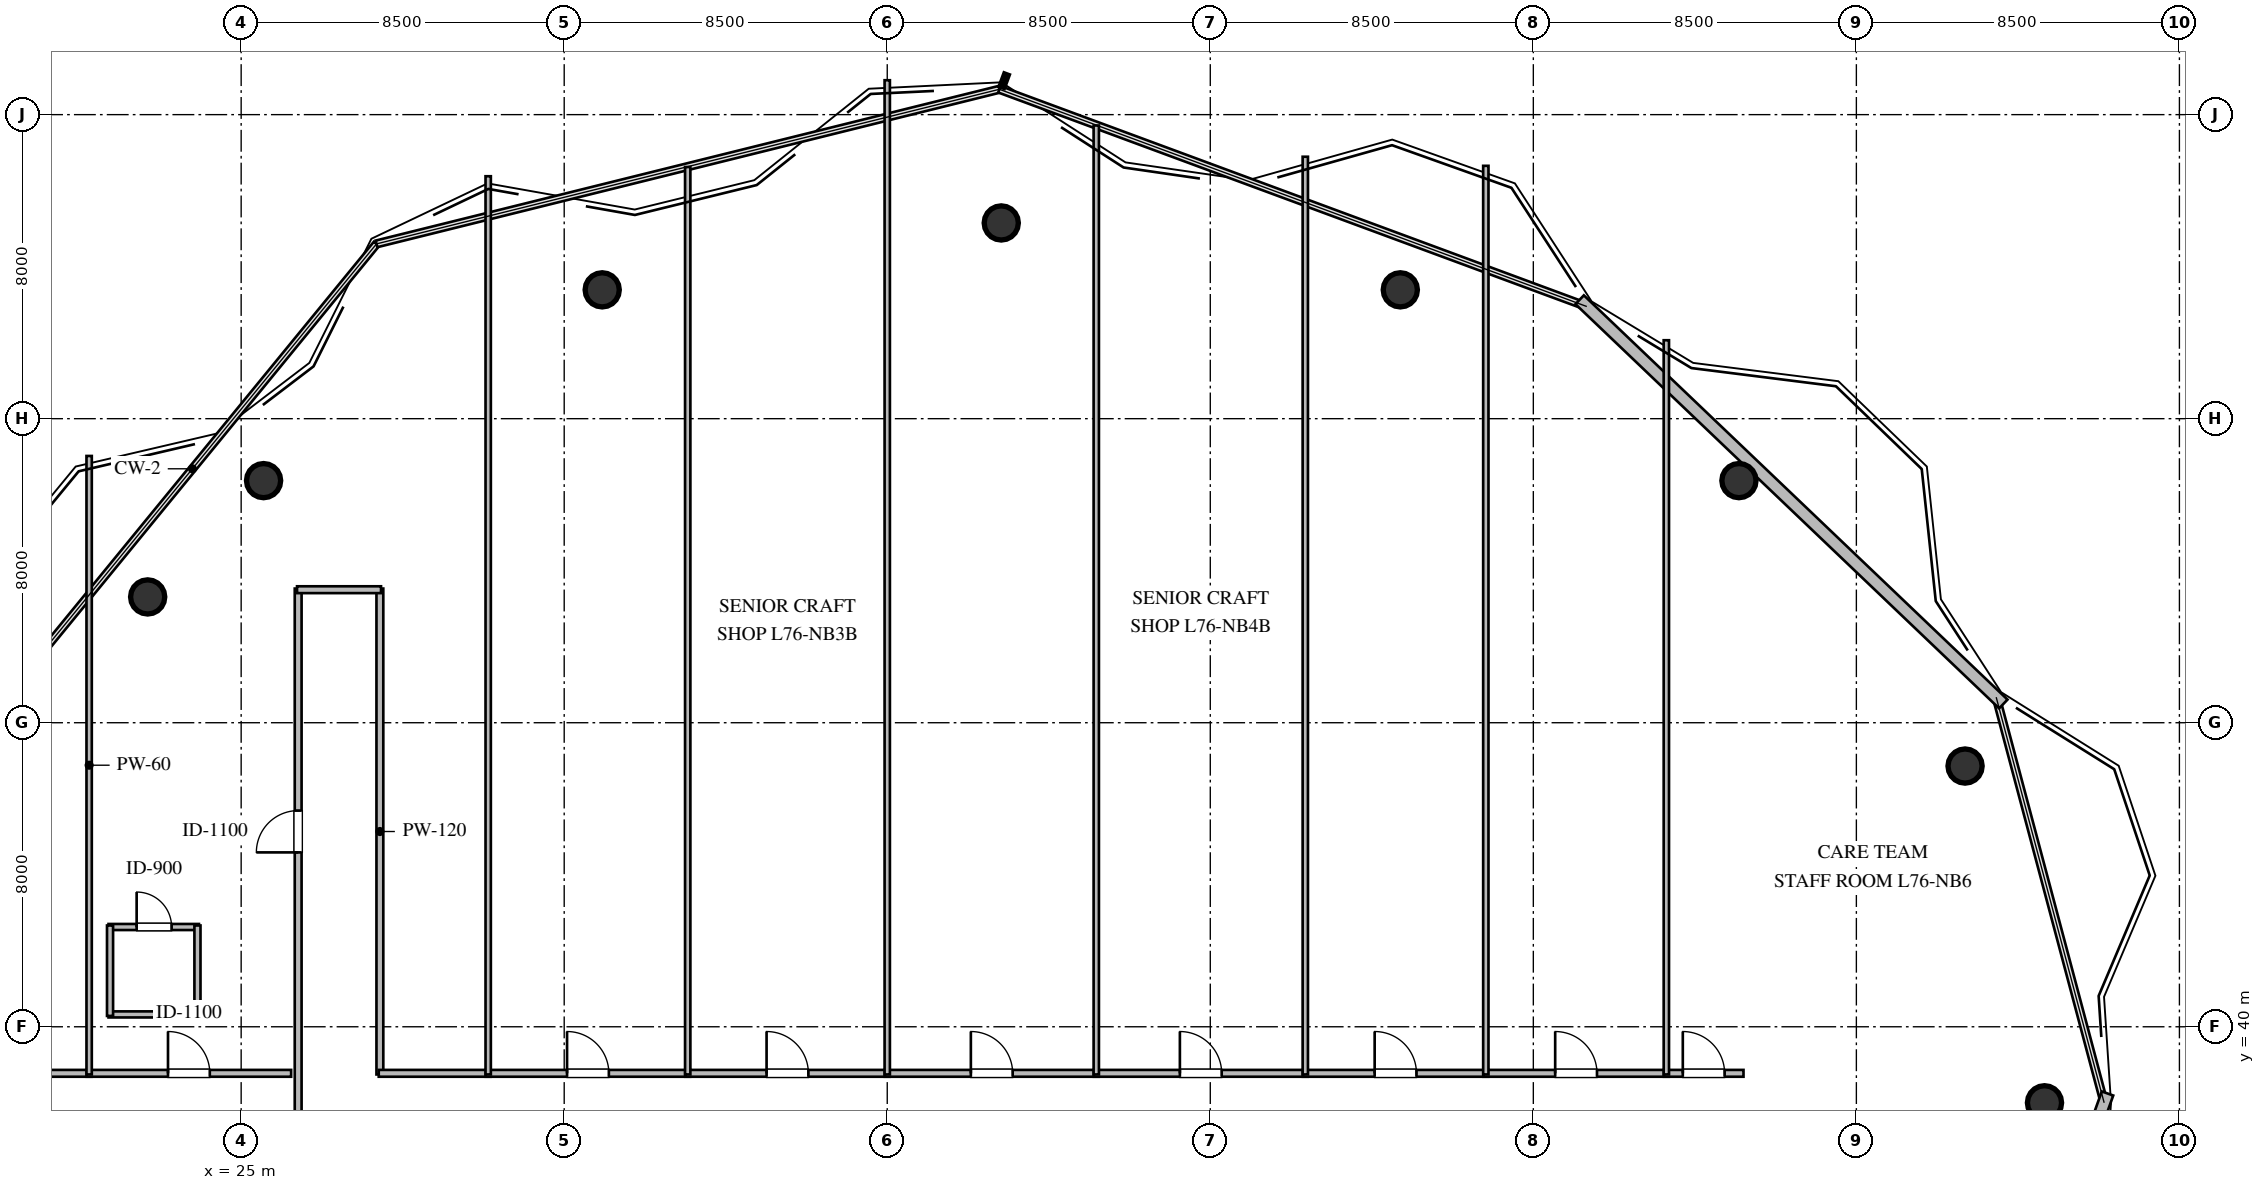
"""IFC4 building model, lengths in metres.
Left out: names, types, materials, properties, quantities, classifications, styles, units other than length and angle.
Written with IfcOpenShell. Run it as: python <this file> out.ifc"""

import sys

from ifc_helpers import new_model, si_unit, direction, frame, frame_2d, origin, origin_2d, place, context, subcontext, project, spatial, rectangle, circle, extrude, element, fill, save


model = new_model("IFC4")
c1 = context("Model", 3, precision=1e-05, world=origin(), true_north=direction((0.0, 1.0)))
c2 = subcontext(c1, "Body", "Model", "MODEL_VIEW")
j1 = project(units=[si_unit("LENGTHUNIT", "METRE"), si_unit("PLANEANGLEUNIT", "RADIAN")], contexts=[c1])
p1 = place(None, origin())
s1 = spatial("IfcSite", under=j1, at=p1, CompositionType="ELEMENT")
p2 = place(p1, origin())
s2 = spatial("IfcBuilding", under=s1, at=p2, CompositionType="ELEMENT")
p3 = place(p2, frame((0.0, 0.0, 289.0)))
s3 = spatial("IfcBuildingStorey", under=s2, at=p3, CompositionType="ELEMENT", Elevation=289.0)
for number, where, z_axis, x_axis in (
    (1, (72.45, 38.0, 0.0), (0.0, 0.0, 1.0), (1.0, 0.0, 0.0)),
    (2, (70.36, 46.86, 0.0), (0.0, 0.0, 1.0), (1.0, 0.0, 0.0)),
    (3, (64.41, 54.37, 0.0), (0.0, 0.0, 1.0), (1.0, 0.0, 0.0)),
    (4, (55.5, 59.39, 0.0), (0.0, 0.0, 1.0), (1.0, 0.0, 0.0)),
    (5, (45.0, 61.15, 0.0), (0.0, 0.0, 1.0), (1.0, 0.0, 0.0)),
    (6, (34.5, 59.39, 0.0), (0.0, 0.0, 1.0), (1.0, 0.0, 0.0)),
    (7, (25.59, 54.37, 0.0), (0.0, 0.0, 1.0), (1.0, 0.0, 0.0)),
    (8, (22.54, 51.31, 0.0), (0.0, 0.0, 1.0), (1.0, 0.0, 0.0)),
):
    element("IfcColumn", number, at=place(p3, frame(where, z_axis=z_axis, x_axis=x_axis)), inside=s3, PredefinedType="COLUMN", context=c2, shape_type="SweptSolid", body=[
        extrude(circle(Radius=0.45, at=origin_2d()), origin(), (0.0, 0.0, 1.0), 3.8),
    ])
p4 = place(p3, frame((74.108, 38.245, 0.0), z_axis=(0.0, 0.0, 1.0), x_axis=(-0.337073777429, -0.941478235845, 0.0)))
e9 = element("IfcWall", 9, at=p4, inside=s3, PredefinedType="STANDARD", context=c2, shape_type="SweptSolid", body=[
    extrude(rectangle(XDim=13.673, YDim=0.32, at=frame_2d((6.837, 0.0))), origin(), (0.0, 0.0, 1.0), 3.48),
])
p5 = place(p3, frame((60.219, 59.13, 0.0), z_axis=(0.0, 0.0, 1.0), x_axis=(0.723493659852, -0.690331025056, 0.0)))
e10 = element("IfcWall", 10, at=p5, inside=s3, PredefinedType="STANDARD", context=c2, shape_type="SweptSolid", body=[
    extrude(rectangle(XDim=15.408, YDim=0.32, at=frame_2d((7.704, 0.0))), origin(), (0.0, 0.0, 1.0), 3.48),
])
p6 = place(p3, frame((21.51, 40.325, 0.0), z_axis=(0.0, 0.0, 1.0), x_axis=(1.0, 0.0, 0.0)))
e11 = element("IfcWall", 11, at=p6, inside=s3, PredefinedType="PLUMBINGWALL", context=c2, shape_type="SweptSolid", body=[
    extrude(rectangle(XDim=2.38, YDim=0.16, at=frame_2d((1.19, 0.0))), origin(), (0.0, 0.0, 1.0), 3.48),
])
p7 = place(p3, frame((21.51, 42.625, 0.0), z_axis=(0.0, 0.0, 1.0), x_axis=(1.0, 0.0, 0.0)))
e12 = element("IfcWall", 12, at=p7, inside=s3, PredefinedType="PLUMBINGWALL", context=c2, shape_type="SweptSolid", body=[
    extrude(rectangle(XDim=2.38, YDim=0.16, at=frame_2d((1.19, 0.0))), origin(), (0.0, 0.0, 1.0), 3.48),
])
p8 = place(p7, frame((0.74, 0.0, 0.0)))
e13 = element("IfcOpeningElement", 13, at=p8, cuts=e12, PredefinedType="OPENING", context=c2, shape_type="SweptSolid", body=[
    extrude(rectangle(XDim=0.92, YDim=2.1, at=frame_2d((0.46, 1.05))), frame((0.0, 0.09, 0.0), z_axis=(0.0, -1.0, 0.0), x_axis=(1.0, 0.0, 0.0)), (0.0, 0.0, 1.0), 0.18),
])
p9 = place(p3, frame((21.55, 40.285, 0.0), z_axis=(0.0, 0.0, 1.0), x_axis=(0.0, 1.0, 0.0)))
e14 = element("IfcWall", 14, at=p9, inside=s3, PredefinedType="PLUMBINGWALL", context=c2, shape_type="SweptSolid", body=[
    extrude(rectangle(XDim=2.38, YDim=0.16, at=frame_2d((1.19, 0.0))), origin(), (0.0, 0.0, 1.0), 2.47),
])
p10 = place(p3, frame((23.85, 40.285, 0.0), z_axis=(0.0, 0.0, 1.0), x_axis=(0.0, 1.0, 0.0)))
e15 = element("IfcWall", 15, at=p10, inside=s3, PredefinedType="PLUMBINGWALL", context=c2, shape_type="SweptSolid", body=[
    extrude(rectangle(XDim=2.38, YDim=0.16, at=frame_2d((1.19, 0.0))), origin(), (0.0, 0.0, 1.0), 2.926),
])
p11 = place(p3, frame((15.651, 38.775, 0.0), z_axis=(0.0, 0.0, 1.0), x_axis=(1.0, 0.0, 0.0)))
e16 = element("IfcWall", 16, at=p11, inside=s3, PredefinedType="PARTITIONING", context=c2, shape_type="SweptSolid", body=[
    extrude(rectangle(XDim=5.414, YDim=0.18, at=frame_2d((2.707, 0.0))), origin(), (0.0, 0.0, 1.0), 3.48),
])
p12 = place(p11, frame((2.157, 0.0, 0.0)))
e17 = element("IfcOpeningElement", 17, at=p12, cuts=e16, PredefinedType="OPENING", context=c2, shape_type="SweptSolid", body=[
    extrude(rectangle(XDim=1.1, YDim=2.1, at=frame_2d((0.55, 1.05))), frame((0.0, 0.1, 0.0), z_axis=(0.0, -1.0, 0.0), x_axis=(1.0, 0.0, 0.0)), (0.0, 0.0, 1.0), 0.2),
])
p13 = place(p3, frame((20.935, 38.775, 0.0), z_axis=(0.0, 0.0, 1.0), x_axis=(1.0, 0.0, 0.0)))
e18 = element("IfcWall", 18, at=p13, inside=s3, PredefinedType="PARTITIONING", context=c2, shape_type="SweptSolid", body=[
    extrude(rectangle(XDim=5.38, YDim=0.18, at=frame_2d((2.69, 0.0))), origin(), (0.0, 0.0, 1.0), 3.48),
])
p14 = place(p13, frame((2.14, 0.0, 0.0)))
e19 = element("IfcOpeningElement", 19, at=p14, cuts=e18, PredefinedType="OPENING", context=c2, shape_type="SweptSolid", body=[
    extrude(rectangle(XDim=1.1, YDim=2.1, at=frame_2d((0.55, 1.05))), frame((0.0, 0.1, 0.0), z_axis=(0.0, -1.0, 0.0), x_axis=(1.0, 0.0, 0.0)), (0.0, 0.0, 1.0), 0.2),
])
p15 = place(p3, frame((26.5, 36.41, 0.0), z_axis=(0.0, 0.0, 1.0), x_axis=(0.0, 1.0, 0.0)))
e20 = element("IfcWall", 20, at=p15, inside=s3, PredefinedType="PARTITIONING", context=c2, shape_type="SweptSolid", body=[
    extrude(rectangle(XDim=15.12, YDim=0.18, at=frame_2d((7.56, 0.0))), origin(), (0.0, 0.0, 1.0), 3.48),
])
p16 = place(p15, frame((8.178, 0.0, 0.0)))
e21 = element("IfcOpeningElement", 21, at=p16, cuts=e20, PredefinedType="OPENING", context=c2, shape_type="SweptSolid", body=[
    extrude(rectangle(XDim=1.1, YDim=2.1, at=frame_2d((0.55, 1.05))), frame((0.0, 0.1, 0.0), z_axis=(0.0, -1.0, 0.0), x_axis=(1.0, 0.0, 0.0)), (0.0, 0.0, 1.0), 0.2),
])
p17 = place(p3, frame((28.65, 51.53, 0.0), z_axis=(0.0, 0.0, 1.0), x_axis=(0.0, -1.0, 0.0)))
e22 = element("IfcWall", 22, at=p17, inside=s3, PredefinedType="PARTITIONING", context=c2, shape_type="SweptSolid", body=[
    extrude(rectangle(XDim=12.785, YDim=0.18, at=frame_2d((6.393, 0.0))), origin(), (0.0, 0.0, 1.0), 3.48),
])
p18 = place(p3, frame((28.62, 38.775, 0.0), z_axis=(0.0, 0.0, 1.0), x_axis=(1.0, 0.0, 0.0)))
e23 = element("IfcWall", 23, at=p18, inside=s3, PredefinedType="PARTITIONING", context=c2, shape_type="SweptSolid", body=[
    extrude(rectangle(XDim=2.945, YDim=0.18, at=frame_2d((1.472, 0.0))), origin(), (0.0, 0.0, 1.0), 3.48),
])
p19 = place(p3, frame((26.47, 51.5, 0.0), z_axis=(0.0, 0.0, 1.0), x_axis=(1.0, 0.0, 0.0)))
e24 = element("IfcWall", 24, at=p19, inside=s3, PredefinedType="PARTITIONING", context=c2, shape_type="SweptSolid", body=[
    extrude(rectangle(XDim=2.21, YDim=0.18, at=frame_2d((1.105, 0.0))), origin(), (0.0, 0.0, 1.0), 3.48),
])
p20 = place(p3, frame((31.435, 38.775, 0.0), z_axis=(0.0, 0.0, 1.0), x_axis=(1.0, 0.0, 0.0)))
e25 = element("IfcWall", 25, at=p20, inside=s3, PredefinedType="PARTITIONING", context=c2, shape_type="SweptSolid", body=[
    extrude(rectangle(XDim=5.38, YDim=0.18, at=frame_2d((2.69, 0.0))), origin(), (0.0, 0.0, 1.0), 3.48),
])
p21 = place(p20, frame((2.14, 0.0, 0.0)))
e26 = element("IfcOpeningElement", 26, at=p21, cuts=e25, PredefinedType="OPENING", context=c2, shape_type="SweptSolid", body=[
    extrude(rectangle(XDim=1.1, YDim=2.1, at=frame_2d((0.55, 1.05))), frame((0.0, 0.1, 0.0), z_axis=(0.0, -1.0, 0.0), x_axis=(1.0, 0.0, 0.0)), (0.0, 0.0, 1.0), 0.2),
])
p22 = place(p3, frame((36.685, 38.775, 0.0), z_axis=(0.0, 0.0, 1.0), x_axis=(1.0, 0.0, 0.0)))
e27 = element("IfcWall", 27, at=p22, inside=s3, PredefinedType="PARTITIONING", context=c2, shape_type="SweptSolid", body=[
    extrude(rectangle(XDim=5.38, YDim=0.18, at=frame_2d((2.69, 0.0))), origin(), (0.0, 0.0, 1.0), 3.48),
])
p23 = place(p22, frame((2.14, 0.0, 0.0)))
e28 = element("IfcOpeningElement", 28, at=p23, cuts=e27, PredefinedType="OPENING", context=c2, shape_type="SweptSolid", body=[
    extrude(rectangle(XDim=1.1, YDim=2.1, at=frame_2d((0.55, 1.05))), frame((0.0, 0.1, 0.0), z_axis=(0.0, -1.0, 0.0), x_axis=(1.0, 0.0, 0.0)), (0.0, 0.0, 1.0), 0.2),
])
p24 = place(p3, frame((41.935, 38.775, 0.0), z_axis=(0.0, 0.0, 1.0), x_axis=(1.0, 0.0, 0.0)))
e29 = element("IfcWall", 29, at=p24, inside=s3, PredefinedType="PARTITIONING", context=c2, shape_type="SweptSolid", body=[
    extrude(rectangle(XDim=5.63, YDim=0.18, at=frame_2d((2.815, 0.0))), origin(), (0.0, 0.0, 1.0), 3.48),
])
p25 = place(p24, frame((2.265, 0.0, 0.0)))
e30 = element("IfcOpeningElement", 30, at=p25, cuts=e29, PredefinedType="OPENING", context=c2, shape_type="SweptSolid", body=[
    extrude(rectangle(XDim=1.1, YDim=2.1, at=frame_2d((0.55, 1.05))), frame((0.0, 0.1, 0.0), z_axis=(0.0, -1.0, 0.0), x_axis=(1.0, 0.0, 0.0)), (0.0, 0.0, 1.0), 0.2),
])
p26 = place(p3, frame((47.435, 38.775, 0.0), z_axis=(0.0, 0.0, 1.0), x_axis=(1.0, 0.0, 0.0)))
e31 = element("IfcWall", 31, at=p26, inside=s3, PredefinedType="PARTITIONING", context=c2, shape_type="SweptSolid", body=[
    extrude(rectangle(XDim=5.63, YDim=0.18, at=frame_2d((2.815, 0.0))), origin(), (0.0, 0.0, 1.0), 3.48),
])
p27 = place(p26, frame((2.265, 0.0, 0.0)))
e32 = element("IfcOpeningElement", 32, at=p27, cuts=e31, PredefinedType="OPENING", context=c2, shape_type="SweptSolid", body=[
    extrude(rectangle(XDim=1.1, YDim=2.1, at=frame_2d((0.55, 1.05))), frame((0.0, 0.1, 0.0), z_axis=(0.0, -1.0, 0.0), x_axis=(1.0, 0.0, 0.0)), (0.0, 0.0, 1.0), 0.2),
])
p28 = place(p3, frame((52.935, 38.775, 0.0), z_axis=(0.0, 0.0, 1.0), x_axis=(1.0, 0.0, 0.0)))
e33 = element("IfcWall", 33, at=p28, inside=s3, PredefinedType="PARTITIONING", context=c2, shape_type="SweptSolid", body=[
    extrude(rectangle(XDim=4.88, YDim=0.18, at=frame_2d((2.44, 0.0))), origin(), (0.0, 0.0, 1.0), 3.48),
])
p29 = place(p28, frame((1.89, 0.0, 0.0)))
e34 = element("IfcOpeningElement", 34, at=p29, cuts=e33, PredefinedType="OPENING", context=c2, shape_type="SweptSolid", body=[
    extrude(rectangle(XDim=1.1, YDim=2.1, at=frame_2d((0.55, 1.05))), frame((0.0, 0.1, 0.0), z_axis=(0.0, -1.0, 0.0), x_axis=(1.0, 0.0, 0.0)), (0.0, 0.0, 1.0), 0.2),
])
p30 = place(p3, frame((57.685, 38.775, 0.0), z_axis=(0.0, 0.0, 1.0), x_axis=(1.0, 0.0, 0.0)))
e35 = element("IfcWall", 35, at=p30, inside=s3, PredefinedType="PARTITIONING", context=c2, shape_type="SweptSolid", body=[
    extrude(rectangle(XDim=4.88, YDim=0.18, at=frame_2d((2.44, 0.0))), origin(), (0.0, 0.0, 1.0), 3.48),
])
p31 = place(p30, frame((1.89, 0.0, 0.0)))
e36 = element("IfcOpeningElement", 36, at=p31, cuts=e35, PredefinedType="OPENING", context=c2, shape_type="SweptSolid", body=[
    extrude(rectangle(XDim=1.1, YDim=2.1, at=frame_2d((0.55, 1.05))), frame((0.0, 0.1, 0.0), z_axis=(0.0, -1.0, 0.0), x_axis=(1.0, 0.0, 0.0)), (0.0, 0.0, 1.0), 0.2),
])
p32 = place(p3, frame((62.435, 38.775, 0.0), z_axis=(0.0, 0.0, 1.0), x_axis=(1.0, 0.0, 0.0)))
e37 = element("IfcWall", 37, at=p32, inside=s3, PredefinedType="PARTITIONING", context=c2, shape_type="SweptSolid", body=[
    extrude(rectangle(XDim=2.095, YDim=0.18, at=frame_2d((1.047, 0.0))), origin(), (0.0, 0.0, 1.0), 3.48),
])
p33 = place(p32, frame((0.498, 0.0, 0.0)))
e38 = element("IfcOpeningElement", 38, at=p33, cuts=e37, PredefinedType="OPENING", context=c2, shape_type="SweptSolid", body=[
    extrude(rectangle(XDim=1.1, YDim=2.1, at=frame_2d((0.55, 1.05))), frame((0.0, 0.1, 0.0), z_axis=(0.0, -1.0, 0.0), x_axis=(1.0, 0.0, 0.0)), (0.0, 0.0, 1.0), 0.2),
])
p34 = place(p3, frame((21.0, 55.019, 0.0), z_axis=(0.0, 0.0, 1.0), x_axis=(0.0, -1.0, 0.0)))
e39 = element("IfcWall", 39, at=p34, inside=s3, PredefinedType="PARTITIONING", context=c2, shape_type="SweptSolid", body=[
    extrude(rectangle(XDim=16.274, YDim=0.14, at=frame_2d((8.137, 0.0))), origin(), (0.0, 0.0, 1.0), 3.48),
])
p35 = place(p3, frame((31.5, 62.379, 0.0), z_axis=(0.0, 0.0, 1.0), x_axis=(0.0, -1.0, 0.0)))
e40 = element("IfcWall", 40, at=p35, inside=s3, PredefinedType="PARTITIONING", context=c2, shape_type="SweptSolid", body=[
    extrude(rectangle(XDim=23.634, YDim=0.14, at=frame_2d((11.817, 0.0))), origin(), (0.0, 0.0, 1.0), 3.48),
])
p36 = place(p3, frame((36.75, 62.622, 0.0), z_axis=(0.0, 0.0, 1.0), x_axis=(0.0, -1.0, 0.0)))
e41 = element("IfcWall", 41, at=p36, inside=s3, PredefinedType="PARTITIONING", context=c2, shape_type="SweptSolid", body=[
    extrude(rectangle(XDim=23.876, YDim=0.14, at=frame_2d((11.938, 0.0))), origin(), (0.0, 0.0, 1.0), 3.48),
])
p37 = place(p3, frame((42.0, 64.905, 0.0), z_axis=(0.0, 0.0, 1.0), x_axis=(0.0, -1.0, 0.0)))
e42 = element("IfcWall", 42, at=p37, inside=s3, PredefinedType="PARTITIONING", context=c2, shape_type="SweptSolid", body=[
    extrude(rectangle(XDim=26.16, YDim=0.14, at=frame_2d((13.08, 0.0))), origin(), (0.0, 0.0, 1.0), 3.48),
])
p38 = place(p3, frame((47.5, 63.714, 0.0), z_axis=(0.0, 0.0, 1.0), x_axis=(0.0, -1.0, 0.0)))
e43 = element("IfcWall", 43, at=p38, inside=s3, PredefinedType="PARTITIONING", context=c2, shape_type="SweptSolid", body=[
    extrude(rectangle(XDim=24.969, YDim=0.14, at=frame_2d((12.485, 0.0))), origin(), (0.0, 0.0, 1.0), 3.48),
])
p39 = place(p3, frame((53.0, 62.892, 0.0), z_axis=(0.0, 0.0, 1.0), x_axis=(0.0, -1.0, 0.0)))
e44 = element("IfcWall", 44, at=p39, inside=s3, PredefinedType="PARTITIONING", context=c2, shape_type="SweptSolid", body=[
    extrude(rectangle(XDim=24.147, YDim=0.14, at=frame_2d((12.073, 0.0))), origin(), (0.0, 0.0, 1.0), 3.48),
])
p40 = place(p3, frame((57.75, 62.653, 0.0), z_axis=(0.0, 0.0, 1.0), x_axis=(0.0, -1.0, 0.0)))
e45 = element("IfcWall", 45, at=p40, inside=s3, PredefinedType="PARTITIONING", context=c2, shape_type="SweptSolid", body=[
    extrude(rectangle(XDim=23.908, YDim=0.14, at=frame_2d((11.954, 0.0))), origin(), (0.0, 0.0, 1.0), 3.48),
])
p41 = place(p3, frame((62.5, 58.064, 0.0), z_axis=(0.0, 0.0, 1.0), x_axis=(0.0, -1.0, 0.0)))
e46 = element("IfcWall", 46, at=p41, inside=s3, PredefinedType="PARTITIONING", context=c2, shape_type="SweptSolid", body=[
    extrude(rectangle(XDim=19.319, YDim=0.14, at=frame_2d((9.659, 0.0))), origin(), (0.0, 0.0, 1.0), 3.48),
])
p42 = place(p8, origin())
e47 = element("IfcDoor", 47, at=p42, inside=s3, OperationType="SINGLE_SWING_LEFT", PredefinedType="DOOR", context=c2, shape_type="SweptSolid", body=[
    extrude(rectangle(XDim=0.92, YDim=2.1, at=frame_2d((0.46, 1.05))), frame((0.0, 0.025, 0.0), z_axis=(0.0, -1.0, 0.0), x_axis=(1.0, 0.0, 0.0)), (0.0, 0.0, 1.0), 0.05),
])
fill(e13, e47)
p43 = place(p14, origin())
e48 = element("IfcDoor", 48, at=p43, inside=s3, OperationType="SINGLE_SWING_LEFT", PredefinedType="DOOR", context=c2, shape_type="SweptSolid", body=[
    extrude(rectangle(XDim=1.1, YDim=2.1, at=frame_2d((0.55, 1.05))), frame((0.0, 0.025, 0.0), z_axis=(0.0, -1.0, 0.0), x_axis=(1.0, 0.0, 0.0)), (0.0, 0.0, 1.0), 0.05),
])
fill(e19, e48)
p44 = place(p16, origin())
e49 = element("IfcDoor", 49, at=p44, inside=s3, OperationType="SINGLE_SWING_LEFT", PredefinedType="DOOR", context=c2, shape_type="SweptSolid", body=[
    extrude(rectangle(XDim=1.1, YDim=2.1, at=frame_2d((0.55, 1.05))), frame((0.0, 0.025, 0.0), z_axis=(0.0, -1.0, 0.0), x_axis=(1.0, 0.0, 0.0)), (0.0, 0.0, 1.0), 0.05),
])
fill(e21, e49)
p45 = place(p21, origin())
e50 = element("IfcDoor", 50, at=p45, inside=s3, OperationType="SINGLE_SWING_LEFT", PredefinedType="DOOR", context=c2, shape_type="SweptSolid", body=[
    extrude(rectangle(XDim=1.1, YDim=2.1, at=frame_2d((0.55, 1.05))), frame((0.0, 0.025, 0.0), z_axis=(0.0, -1.0, 0.0), x_axis=(1.0, 0.0, 0.0)), (0.0, 0.0, 1.0), 0.05),
])
fill(e26, e50)
p46 = place(p23, origin())
e51 = element("IfcDoor", 51, at=p46, inside=s3, OperationType="SINGLE_SWING_LEFT", PredefinedType="DOOR", context=c2, shape_type="SweptSolid", body=[
    extrude(rectangle(XDim=1.1, YDim=2.1, at=frame_2d((0.55, 1.05))), frame((0.0, 0.025, 0.0), z_axis=(0.0, -1.0, 0.0), x_axis=(1.0, 0.0, 0.0)), (0.0, 0.0, 1.0), 0.05),
])
fill(e28, e51)
p47 = place(p25, origin())
e52 = element("IfcDoor", 52, at=p47, inside=s3, OperationType="SINGLE_SWING_LEFT", PredefinedType="DOOR", context=c2, shape_type="SweptSolid", body=[
    extrude(rectangle(XDim=1.1, YDim=2.1, at=frame_2d((0.55, 1.05))), frame((0.0, 0.025, 0.0), z_axis=(0.0, -1.0, 0.0), x_axis=(1.0, 0.0, 0.0)), (0.0, 0.0, 1.0), 0.05),
])
fill(e30, e52)
p48 = place(p27, origin())
e53 = element("IfcDoor", 53, at=p48, inside=s3, OperationType="SINGLE_SWING_LEFT", PredefinedType="DOOR", context=c2, shape_type="SweptSolid", body=[
    extrude(rectangle(XDim=1.1, YDim=2.1, at=frame_2d((0.55, 1.05))), frame((0.0, 0.025, 0.0), z_axis=(0.0, -1.0, 0.0), x_axis=(1.0, 0.0, 0.0)), (0.0, 0.0, 1.0), 0.05),
])
fill(e32, e53)
p49 = place(p29, origin())
e54 = element("IfcDoor", 54, at=p49, inside=s3, OperationType="SINGLE_SWING_LEFT", PredefinedType="DOOR", context=c2, shape_type="SweptSolid", body=[
    extrude(rectangle(XDim=1.1, YDim=2.1, at=frame_2d((0.55, 1.05))), frame((0.0, 0.025, 0.0), z_axis=(0.0, -1.0, 0.0), x_axis=(1.0, 0.0, 0.0)), (0.0, 0.0, 1.0), 0.05),
])
fill(e34, e54)
p50 = place(p31, origin())
e55 = element("IfcDoor", 55, at=p50, inside=s3, OperationType="SINGLE_SWING_LEFT", PredefinedType="DOOR", context=c2, shape_type="SweptSolid", body=[
    extrude(rectangle(XDim=1.1, YDim=2.1, at=frame_2d((0.55, 1.05))), frame((0.0, 0.025, 0.0), z_axis=(0.0, -1.0, 0.0), x_axis=(1.0, 0.0, 0.0)), (0.0, 0.0, 1.0), 0.05),
])
fill(e36, e55)
p51 = place(p33, origin())
e56 = element("IfcDoor", 56, at=p51, inside=s3, OperationType="SINGLE_SWING_LEFT", PredefinedType="DOOR", context=c2, shape_type="SweptSolid", body=[
    extrude(rectangle(XDim=1.1, YDim=2.1, at=frame_2d((0.55, 1.05))), frame((0.0, 0.025, 0.0), z_axis=(0.0, -1.0, 0.0), x_axis=(1.0, 0.0, 0.0)), (0.0, 0.0, 1.0), 0.05),
])
fill(e38, e56)
save(model, sys.argv[1])
